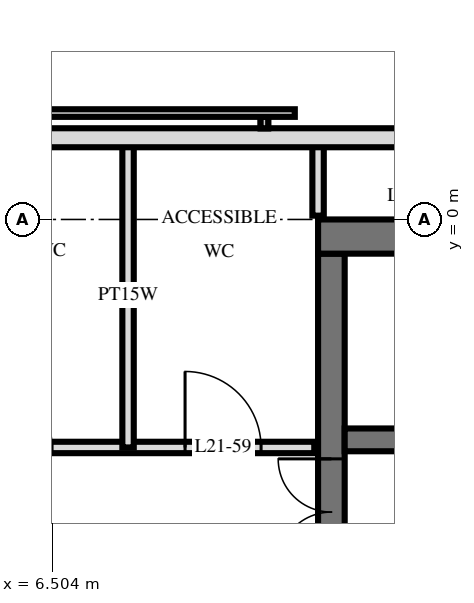
"""IFC4 building model, lengths in metres.
Left out: names, types, materials, properties, quantities, classifications, styles, units other than length and angle.
Written with IfcOpenShell. Run it as: python <this file> out.ifc"""

import sys

from ifc_helpers import new_model, si_unit, direction, frame, frame_2d, origin, place, context, subcontext, project, spatial, rectangle, extrude, element, fill, save


model = new_model("IFC4")
c1 = context("Model", 3, precision=1e-05, world=origin(), true_north=direction((0.0, 1.0)))
c2 = subcontext(c1, "Body", "Model", "MODEL_VIEW")
j1 = project(units=[si_unit("LENGTHUNIT", "METRE"), si_unit("PLANEANGLEUNIT", "RADIAN")], contexts=[c1])
p1 = place(None, origin())
s1 = spatial("IfcSite", under=j1, at=p1, CompositionType="ELEMENT")
p2 = place(p1, origin())
s2 = spatial("IfcBuilding", under=s1, at=p2, CompositionType="ELEMENT")
p3 = place(p2, frame((0.0, 0.0, 85.2)))
s3 = spatial("IfcBuildingStorey", under=s2, at=p3, CompositionType="ELEMENT", Elevation=85.2)
p4 = place(p3, frame((10.0, -0.225, 0.0), z_axis=(0.0, 0.0, 1.0), x_axis=(1.0, 0.0, 0.0)))
e1 = element("IfcWall", 1, at=p4, inside=s3, PredefinedType="SHEAR", context=c2, shape_type="SweptSolid", body=[
    extrude(rectangle(XDim=19.5, YDim=0.45, at=frame_2d((9.75, 0.0))), origin(), (0.0, 0.0, 1.0), 3.6),
])
p5 = place(p3, frame((10.175, -14.55, 0.0), z_axis=(0.0, 0.0, 1.0), x_axis=(0.0, 1.0, 0.0)))
e2 = element("IfcWall", 2, at=p5, inside=s3, PredefinedType="SHEAR", context=c2, shape_type="SweptSolid", body=[
    extrude(rectangle(XDim=14.1, YDim=0.35, at=frame_2d((7.05, 0.0))), origin(), (0.0, 0.0, 1.0), 3.6),
])
p6 = place(p5, frame((8.4, 0.0, 0.0)))
e3 = element("IfcOpeningElement", 3, at=p6, cuts=e2, PredefinedType="OPENING", context=c2, shape_type="SweptSolid", body=[
    extrude(rectangle(XDim=1.4, YDim=2.4, at=frame_2d((0.7, 1.2))), frame((0.0, 0.185, 0.0), z_axis=(0.0, -1.0, 0.0), x_axis=(1.0, 0.0, 0.0)), (0.0, 0.0, 1.0), 0.37),
])
p7 = place(p5, frame((10.0, 0.0, 0.0)))
e4 = element("IfcOpeningElement", 4, at=p7, cuts=e2, PredefinedType="OPENING", context=c2, shape_type="SweptSolid", body=[
    extrude(rectangle(XDim=1.4, YDim=2.4, at=frame_2d((0.7, 1.2))), frame((0.0, 0.185, 0.0), z_axis=(0.0, -1.0, 0.0), x_axis=(1.0, 0.0, 0.0)), (0.0, 0.0, 1.0), 0.37),
])
p8 = place(p5, frame((4.0, 0.0, 0.0)))
e5 = element("IfcOpeningElement", 5, at=p8, cuts=e2, PredefinedType="OPENING", context=c2, shape_type="SweptSolid", body=[
    extrude(rectangle(XDim=1.2, YDim=2.1, at=frame_2d((0.6, 1.05))), frame((0.0, 0.185, 0.0), z_axis=(0.0, -1.0, 0.0), x_axis=(1.0, 0.0, 0.0)), (0.0, 0.0, 1.0), 0.37),
])
p9 = place(p3, frame((10.35, -2.9, 0.0), z_axis=(0.0, 0.0, 1.0), x_axis=(1.0, 0.0, 0.0)))
e6 = element("IfcWall", 6, at=p9, inside=s3, PredefinedType="SHEAR", context=c2, shape_type="SweptSolid", body=[
    extrude(rectangle(XDim=18.7, YDim=0.3, at=frame_2d((9.35, 0.0))), origin(), (0.0, 0.0, 1.0), 3.6),
])
p10 = place(p9, frame((14.65, 0.0, 0.0)))
e7 = element("IfcOpeningElement", 7, at=p10, cuts=e6, PredefinedType="OPENING", context=c2, shape_type="SweptSolid", body=[
    extrude(rectangle(XDim=1.1, YDim=2.1, at=frame_2d((0.55, 1.05))), frame((0.0, 0.16, 0.0), z_axis=(0.0, -1.0, 0.0), x_axis=(1.0, 0.0, 0.0)), (0.0, 0.0, 1.0), 0.32),
])
p11 = place(p9, frame((17.05, 0.0, 0.0)))
e8 = element("IfcOpeningElement", 8, at=p11, cuts=e6, PredefinedType="OPENING", context=c2, shape_type="SweptSolid", body=[
    extrude(rectangle(XDim=1.1, YDim=2.1, at=frame_2d((0.55, 1.05))), frame((0.0, 0.16, 0.0), z_axis=(0.0, -1.0, 0.0), x_axis=(1.0, 0.0, 0.0)), (0.0, 0.0, 1.0), 0.32),
])
p12 = place(p9, frame((6.9, 0.0, 0.0)))
e9 = element("IfcOpeningElement", 9, at=p12, cuts=e6, PredefinedType="OPENING", context=c2, shape_type="SweptSolid", body=[
    extrude(rectangle(XDim=0.9, YDim=2.1, at=frame_2d((0.45, 1.05))), frame((0.0, 0.16, 0.0), z_axis=(0.0, -1.0, 0.0), x_axis=(1.0, 0.0, 0.0)), (0.0, 0.0, 1.0), 0.32),
])
p13 = place(p9, frame((0.85, 0.0, 0.0)))
e10 = element("IfcOpeningElement", 10, at=p13, cuts=e6, PredefinedType="OPENING", context=c2, shape_type="SweptSolid", body=[
    extrude(rectangle(XDim=1.0, YDim=2.1, at=frame_2d((0.5, 1.05))), frame((0.0, 0.16, 0.0), z_axis=(0.0, -1.0, 0.0), x_axis=(1.0, 0.0, 0.0)), (0.0, 0.0, 1.0), 0.32),
])
p14 = place(p9, frame((3.387, 0.0, 0.0)))
e11 = element("IfcOpeningElement", 11, at=p14, cuts=e6, PredefinedType="OPENING", context=c2, shape_type="SweptSolid", body=[
    extrude(rectangle(XDim=1.0, YDim=2.1, at=frame_2d((0.5, 1.05))), frame((0.0, 0.16, 0.0), z_axis=(0.0, -1.0, 0.0), x_axis=(1.0, 0.0, 0.0)), (0.0, 0.0, 1.0), 0.32),
])
p15 = place(p9, frame((4.812, 0.0, 0.0)))
e12 = element("IfcOpeningElement", 12, at=p15, cuts=e6, PredefinedType="OPENING", context=c2, shape_type="SweptSolid", body=[
    extrude(rectangle(XDim=1.0, YDim=2.1, at=frame_2d((0.5, 1.05))), frame((0.0, 0.16, 0.0), z_axis=(0.0, -1.0, 0.0), x_axis=(1.0, 0.0, 0.0)), (0.0, 0.0, 1.0), 0.32),
])
p16 = place(p9, frame((12.1, 0.0, 0.0)))
e13 = element("IfcOpeningElement", 13, at=p16, cuts=e6, PredefinedType="OPENING", context=c2, shape_type="SweptSolid", body=[
    extrude(rectangle(XDim=1.0, YDim=2.1, at=frame_2d((0.5, 1.05))), frame((0.0, 0.16, 0.0), z_axis=(0.0, -1.0, 0.0), x_axis=(1.0, 0.0, 0.0)), (0.0, 0.0, 1.0), 0.32),
])
p17 = place(p3, frame((28.775, 1.075, 0.0), z_axis=(0.0, 0.0, 1.0), x_axis=(-1.0, 0.0, 0.0)))
e14 = element("IfcWall", 14, at=p17, inside=s3, PredefinedType="SOLIDWALL", context=c2, shape_type="SweptSolid", body=[
    extrude(rectangle(XDim=57.551, YDim=0.25, at=frame_2d((28.775, 0.0))), origin(), (0.0, 0.0, 1.0), 3.32),
])
p18 = place(p17, frame((25.325, 0.0, 0.3)))
e15 = element("IfcOpeningElement", 15, at=p18, cuts=e14, PredefinedType="OPENING", context=c2, shape_type="SweptSolid", body=[
    extrude(rectangle(XDim=2.4, YDim=2.1, at=frame_2d((1.2, 1.05))), frame((0.0, 0.135, 0.0), z_axis=(0.0, -1.0, 0.0), x_axis=(1.0, 0.0, 0.0)), (0.0, 0.0, 1.0), 0.27),
])
p19 = place(p17, frame((30.275, 0.0, 0.3)))
e16 = element("IfcOpeningElement", 16, at=p19, cuts=e14, PredefinedType="OPENING", context=c2, shape_type="SweptSolid", body=[
    extrude(rectangle(XDim=2.4, YDim=2.1, at=frame_2d((1.2, 1.05))), frame((0.0, 0.135, 0.0), z_axis=(0.0, -1.0, 0.0), x_axis=(1.0, 0.0, 0.0)), (0.0, 0.0, 1.0), 0.27),
])
p20 = place(p17, frame((34.825, 0.0, 0.3)))
e17 = element("IfcOpeningElement", 17, at=p20, cuts=e14, PredefinedType="OPENING", context=c2, shape_type="SweptSolid", body=[
    extrude(rectangle(XDim=2.4, YDim=2.1, at=frame_2d((1.2, 1.05))), frame((0.0, 0.135, 0.0), z_axis=(0.0, -1.0, 0.0), x_axis=(1.0, 0.0, 0.0)), (0.0, 0.0, 1.0), 0.27),
])
p21 = place(p3, frame((10.0, 0.05, 0.0), z_axis=(0.0, 0.0, 1.0), x_axis=(0.0, 1.0, 0.0)))
e18 = element("IfcWall", 18, at=p21, inside=s3, PredefinedType="PLUMBINGWALL", context=c2, shape_type="SweptSolid", body=[
    extrude(rectangle(XDim=0.97, YDim=0.15, at=frame_2d((0.485, 0.0))), origin(), (0.0, 0.0, 1.0), 3.32),
])
p22 = place(p3, frame((7.5, -3.0, 0.0), z_axis=(0.0, 0.0, 1.0), x_axis=(0.0, 1.0, 0.0)))
e19 = element("IfcWall", 19, at=p22, inside=s3, PredefinedType="PLUMBINGWALL", context=c2, shape_type="SweptSolid", body=[
    extrude(rectangle(XDim=4.02, YDim=0.15, at=frame_2d((2.01, 0.0))), origin(), (0.0, 0.0, 1.0), 3.32),
])
p23 = place(p3, frame((-9.95, -3.0, 0.0), z_axis=(0.0, 0.0, 1.0), x_axis=(1.0, 0.0, 0.0)))
e20 = element("IfcWall", 20, at=p23, inside=s3, PredefinedType="PARTITIONING", context=c2, shape_type="SweptSolid", body=[
    extrude(rectangle(XDim=19.9, YDim=0.15, at=frame_2d((9.95, 0.0))), origin(), (0.0, 0.0, 1.0), 3.32),
])
p24 = place(p23, frame((2.2, 0.0, 0.0)))
e21 = element("IfcOpeningElement", 21, at=p24, cuts=e20, PredefinedType="OPENING", context=c2, shape_type="SweptSolid", body=[
    extrude(rectangle(XDim=1.0, YDim=2.1, at=frame_2d((0.5, 1.05))), frame((0.0, 0.085, 0.0), z_axis=(0.0, -1.0, 0.0), x_axis=(1.0, 0.0, 0.0)), (0.0, 0.0, 1.0), 0.17),
])
p25 = place(p23, frame((7.2, 0.0, 0.0)))
e22 = element("IfcOpeningElement", 22, at=p25, cuts=e20, PredefinedType="OPENING", context=c2, shape_type="SweptSolid", body=[
    extrude(rectangle(XDim=1.0, YDim=2.1, at=frame_2d((0.5, 1.05))), frame((0.0, 0.085, 0.0), z_axis=(0.0, -1.0, 0.0), x_axis=(1.0, 0.0, 0.0)), (0.0, 0.0, 1.0), 0.17),
])
p26 = place(p23, frame((11.7, 0.0, 0.0)))
e23 = element("IfcOpeningElement", 23, at=p26, cuts=e20, PredefinedType="OPENING", context=c2, shape_type="SweptSolid", body=[
    extrude(rectangle(XDim=1.0, YDim=2.1, at=frame_2d((0.5, 1.05))), frame((0.0, 0.085, 0.0), z_axis=(0.0, -1.0, 0.0), x_axis=(1.0, 0.0, 0.0)), (0.0, 0.0, 1.0), 0.17),
])
p27 = place(p23, frame((15.45, 0.0, 0.0)))
e24 = element("IfcOpeningElement", 24, at=p27, cuts=e20, PredefinedType="OPENING", context=c2, shape_type="SweptSolid", body=[
    extrude(rectangle(XDim=1.0, YDim=2.1, at=frame_2d((0.5, 1.05))), frame((0.0, 0.085, 0.0), z_axis=(0.0, -1.0, 0.0), x_axis=(1.0, 0.0, 0.0)), (0.0, 0.0, 1.0), 0.17),
])
p28 = place(p23, frame((18.2, 0.0, 0.0)))
e25 = element("IfcOpeningElement", 25, at=p28, cuts=e20, PredefinedType="OPENING", context=c2, shape_type="SweptSolid", body=[
    extrude(rectangle(XDim=1.0, YDim=2.1, at=frame_2d((0.5, 1.05))), frame((0.0, 0.085, 0.0), z_axis=(0.0, -1.0, 0.0), x_axis=(1.0, 0.0, 0.0)), (0.0, 0.0, 1.0), 0.17),
])
p29 = place(p7, origin())
e26 = element("IfcDoor", 26, at=p29, inside=s3, OperationType="DOUBLE_DOOR_SINGLE_SWING", PredefinedType="DOOR", context=c2, shape_type="SweptSolid", body=[
    extrude(rectangle(XDim=1.4, YDim=2.4, at=frame_2d((0.7, 1.2))), frame((0.0, 0.025, 0.0), z_axis=(0.0, -1.0, 0.0), x_axis=(1.0, 0.0, 0.0)), (0.0, 0.0, 1.0), 0.05),
])
fill(e4, e26)
p30 = place(p28, origin())
e27 = element("IfcDoor", 27, at=p30, inside=s3, OperationType="SINGLE_SWING_RIGHT", PredefinedType="DOOR", context=c2, shape_type="SweptSolid", body=[
    extrude(rectangle(XDim=1.0, YDim=2.1, at=frame_2d((0.5, 1.05))), frame((0.0, 0.025, 0.0), z_axis=(0.0, -1.0, 0.0), x_axis=(1.0, 0.0, 0.0)), (0.0, 0.0, 1.0), 0.05),
])
fill(e25, e27)
save(model, sys.argv[1])
